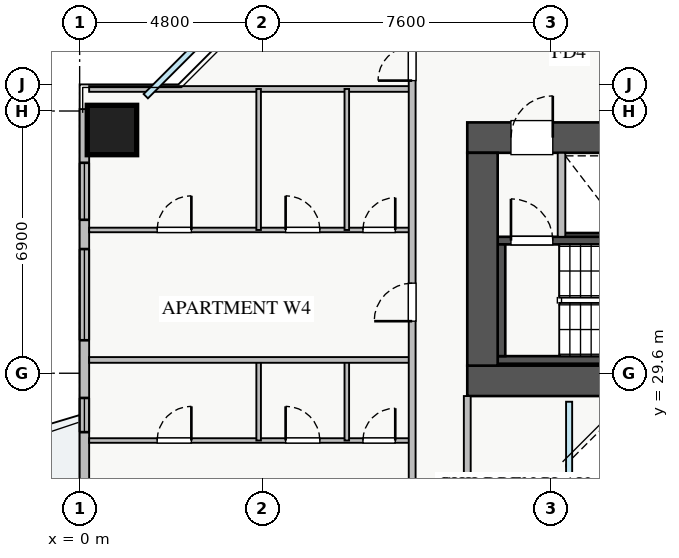
"""IFC4 building model, lengths in metres.
Left out: names, types, materials, properties, quantities, classifications, styles, units other than length and angle.
Written with IfcOpenShell. Run it as: python <this file> out.ifc"""

import sys

from ifc_helpers import new_model, si_unit, direction, frame, frame_2d, origin, origin_2d, place, context, subcontext, project, spatial, rectangle, extrude, source, transform, mapped, element, fill, save


model = new_model("IFC4")
c1 = context("Model", 3, precision=1e-05, world=origin(), true_north=direction((0.0, 1.0)))
c2 = subcontext(c1, "Body", "Model", "MODEL_VIEW")
j1 = project(units=[si_unit("LENGTHUNIT", "METRE"), si_unit("PLANEANGLEUNIT", "RADIAN")], contexts=[c1])
p1 = place(None, origin())
s1 = spatial("IfcSite", under=j1, at=p1, CompositionType="ELEMENT")
p2 = place(p1, origin())
s2 = spatial("IfcBuilding", under=s1, at=p2, CompositionType="ELEMENT")
p3 = place(p2, frame((0.0, 0.0, 60.0)))
s3 = spatial("IfcBuildingStorey", under=s2, at=p3, CompositionType="ELEMENT", Elevation=60.0)
p4 = place(p3, frame((12.68, 33.2, 0.0), z_axis=(0.0, 0.0, 1.0), x_axis=(1.0, 0.0, 0.0)))
e1 = element("IfcWall", 1, at=p4, inside=s3, PredefinedType="SHEAR", context=c2, shape_type="SweptSolid", body=[
    extrude(rectangle(XDim=1.94, YDim=0.18, at=frame_2d((0.97, 0.0))), origin(), (0.0, 0.0, 1.0), 3.07),
])
p5 = place(p3, frame((11.0, 29.95, 0.0), z_axis=(0.0, 0.0, 1.0), x_axis=(1.0, 0.0, 0.0)))
e2 = element("IfcWall", 2, at=p5, inside=s3, PredefinedType="SHEAR", context=c2, shape_type="SweptSolid", body=[
    extrude(rectangle(XDim=7.15, YDim=0.2, at=frame_2d((3.575, 0.0))), origin(), (0.0, 0.0, 1.0), 3.25),
])
p6 = place(p3, frame((11.0, 33.09, 0.0), z_axis=(0.0, 0.0, 1.0), x_axis=(1.0, 0.0, 0.0)))
e3 = element("IfcWall", 3, at=p6, inside=s3, PredefinedType="SHEAR", context=c2, shape_type="SweptSolid", body=[
    extrude(rectangle(XDim=7.15, YDim=0.2, at=frame_2d((3.575, 0.0))), origin(), (0.0, 0.0, 1.0), 3.25),
])
p7 = place(p6, frame((0.35, 0.0, 0.0)))
e4 = element("IfcOpeningElement", 4, at=p7, cuts=e3, PredefinedType="OPENING", context=c2, shape_type="SweptSolid", body=[
    extrude(rectangle(XDim=1.1, YDim=2.05, at=frame_2d((0.55, 1.025))), frame((0.0, 0.11, 0.0), z_axis=(0.0, -1.0, 0.0), x_axis=(1.0, 0.0, 0.0)), (0.0, 0.0, 1.0), 0.22),
])
p8 = place(p3, frame((11.1, 30.05, 0.0), z_axis=(0.0, 0.0, 1.0), x_axis=(0.0, 1.0, 0.0)))
e5 = element("IfcWall", 5, at=p8, inside=s3, PredefinedType="SHEAR", context=c2, shape_type="SweptSolid", body=[
    extrude(rectangle(XDim=2.94, YDim=0.2, at=frame_2d((1.47, 0.0))), origin(), (0.0, 0.0, 1.0), 3.25),
])
p9 = place(p3, frame((10.2, 29.4, 0.0), z_axis=(0.0, 0.0, 1.0), x_axis=(1.0, 0.0, 0.0)))
e6 = element("IfcWall", 6, at=p9, inside=s3, PredefinedType="SHEAR", context=c2, shape_type="SweptSolid", body=[
    extrude(rectangle(XDim=17.6, YDim=0.8, at=frame_2d((8.8, 0.0))), origin(), (0.0, 0.0, 1.0), 3.25),
])
p10 = place(p3, frame((10.2, 35.8, 0.0), z_axis=(0.0, 0.0, 1.0), x_axis=(1.0, 0.0, 0.0)))
e7 = element("IfcWall", 7, at=p10, inside=s3, PredefinedType="SHEAR", context=c2, shape_type="SweptSolid", body=[
    extrude(rectangle(XDim=17.6, YDim=0.8, at=frame_2d((8.8, 0.0))), origin(), (0.0, 0.0, 1.0), 3.25),
])
p11 = place(p10, frame((1.15, 0.0, 0.0)))
e8 = element("IfcOpeningElement", 8, at=p11, cuts=e7, PredefinedType="OPENING", context=c2, shape_type="SweptSolid", body=[
    extrude(rectangle(XDim=1.1, YDim=2.05, at=frame_2d((0.55, 1.025))), frame((0.0, 0.41, 0.0), z_axis=(0.0, -1.0, 0.0), x_axis=(1.0, 0.0, 0.0)), (0.0, 0.0, 1.0), 0.82),
])
p12 = place(p10, frame((8.3, 0.0, 0.0)))
e9 = element("IfcOpeningElement", 9, at=p12, cuts=e7, PredefinedType="OPENING", context=c2, shape_type="SweptSolid", body=[
    extrude(rectangle(XDim=1.1, YDim=2.05, at=frame_2d((0.55, 1.025))), frame((0.0, 0.41, 0.0), z_axis=(0.0, -1.0, 0.0), x_axis=(1.0, 0.0, 0.0)), (0.0, 0.0, 1.0), 0.82),
])
p13 = place(p10, frame((10.05, 0.0, 0.0)))
e10 = element("IfcOpeningElement", 10, at=p13, cuts=e7, PredefinedType="OPENING", context=c2, shape_type="SweptSolid", body=[
    extrude(rectangle(XDim=1.1, YDim=2.05, at=frame_2d((0.55, 1.025))), frame((0.0, 0.41, 0.0), z_axis=(0.0, -1.0, 0.0), x_axis=(1.0, 0.0, 0.0)), (0.0, 0.0, 1.0), 0.82),
])
p14 = place(p10, frame((14.74, 0.0, 0.0)))
e11 = element("IfcOpeningElement", 11, at=p14, cuts=e7, PredefinedType="OPENING", context=c2, shape_type="SweptSolid", body=[
    extrude(rectangle(XDim=1.0, YDim=2.05, at=frame_2d((0.5, 1.025))), frame((0.0, 0.41, 0.0), z_axis=(0.0, -1.0, 0.0), x_axis=(1.0, 0.0, 0.0)), (0.0, 0.0, 1.0), 0.82),
])
p15 = place(p10, frame((11.835, 0.0, 0.0)))
e12 = element("IfcOpeningElement", 12, at=p15, cuts=e7, PredefinedType="OPENING", context=c2, shape_type="SweptSolid", body=[
    extrude(rectangle(XDim=1.0, YDim=2.05, at=frame_2d((0.5, 1.025))), frame((0.0, 0.41, 0.0), z_axis=(0.0, -1.0, 0.0), x_axis=(1.0, 0.0, 0.0)), (0.0, 0.0, 1.0), 0.82),
])
p16 = place(p10, frame((13.37, 0.0, 0.0)))
e13 = element("IfcOpeningElement", 13, at=p16, cuts=e7, PredefinedType="OPENING", context=c2, shape_type="SweptSolid", body=[
    extrude(rectangle(XDim=1.0, YDim=2.05, at=frame_2d((0.5, 1.025))), frame((0.0, 0.41, 0.0), z_axis=(0.0, -1.0, 0.0), x_axis=(1.0, 0.0, 0.0)), (0.0, 0.0, 1.0), 0.82),
])
p17 = place(p3, frame((10.6, 29.8, 0.0), z_axis=(0.0, 0.0, 1.0), x_axis=(0.0, 1.0, 0.0)))
e14 = element("IfcWall", 14, at=p17, inside=s3, PredefinedType="SHEAR", context=c2, shape_type="SweptSolid", body=[
    extrude(rectangle(XDim=5.6, YDim=0.8, at=frame_2d((2.8, 0.0))), origin(), (0.0, 0.0, 1.0), 3.25),
])
m1 = source(origin(), c2, "Body", "SweptSolid", [
    extrude(rectangle(XDim=1.3, YDim=1.3, at=origin_2d()), origin(), (0.0, 0.0, 1.0), 3.25),
])
p18 = place(p3, frame((0.85, 36.0, 0.0), z_axis=(0.0, 0.0, 1.0), x_axis=(1.0, 0.0, 0.0)))
e15 = element("IfcColumn", 15, at=p18, inside=s3, PredefinedType="COLUMN", context=c2, shape_type="MappedRepresentation", body=[
    mapped(m1, transform((0.0, 0.0, 0.0), x_axis=(1.0, 0.0, 0.0), y_axis=(0.0, 1.0, 0.0), z_axis=(0.0, 0.0, 1.0), scale=1.0)),
])
p19 = place(p3, frame((0.125, 9.45, 0.0), z_axis=(0.0, 0.0, 1.0), x_axis=(0.0, 1.0, 0.0)))
e16 = element("IfcWall", 16, at=p19, inside=s3, PredefinedType="STANDARD", context=c2, shape_type="SweptSolid", body=[
    extrude(rectangle(XDim=27.1, YDim=0.25, at=frame_2d((13.55, 0.0))), origin(), (0.0, 0.0, 1.0), 2.61),
])
p20 = place(p19, frame((14.4, 0.0, 0.0)))
e17 = element("IfcOpeningElement", 17, at=p20, cuts=e16, PredefinedType="OPENING", context=c2, shape_type="SweptSolid", body=[
    extrude(rectangle(XDim=1.2, YDim=2.1, at=frame_2d((0.6, 1.05))), frame((0.0, 0.135, 0.0), z_axis=(0.0, -1.0, 0.0), x_axis=(1.0, 0.0, 0.0)), (0.0, 0.0, 1.0), 0.27),
])
p21 = place(p19, frame((1.417, 0.0, 0.9)))
e18 = element("IfcOpeningElement", 18, at=p21, cuts=e16, PredefinedType="OPENING", context=c2, shape_type="SweptSolid", body=[
    extrude(rectangle(XDim=1.2, YDim=1.4, at=frame_2d((0.6, 0.7))), frame((0.0, 0.135, 0.0), z_axis=(0.0, -1.0, 0.0), x_axis=(1.0, 0.0, 0.0)), (0.0, 0.0, 1.0), 0.27),
])
p22 = place(p19, frame((24.188, 0.0, 0.9)))
e19 = element("IfcOpeningElement", 19, at=p22, cuts=e16, PredefinedType="OPENING", context=c2, shape_type="SweptSolid", body=[
    extrude(rectangle(XDim=1.5, YDim=1.5, at=frame_2d((0.75, 0.75))), frame((0.0, 0.135, 0.0), z_axis=(0.0, -1.0, 0.0), x_axis=(1.0, 0.0, 0.0)), (0.0, 0.0, 1.0), 0.27),
])
p23 = place(p19, frame((3.722, 0.0, 0.9)))
e20 = element("IfcOpeningElement", 20, at=p23, cuts=e16, PredefinedType="OPENING", context=c2, shape_type="SweptSolid", body=[
    extrude(rectangle(XDim=2.4, YDim=1.5, at=frame_2d((1.2, 0.75))), frame((0.0, 0.135, 0.0), z_axis=(0.0, -1.0, 0.0), x_axis=(1.0, 0.0, 0.0)), (0.0, 0.0, 1.0), 0.27),
])
p24 = place(p19, frame((21.018, 0.0, 0.9)))
e21 = element("IfcOpeningElement", 21, at=p24, cuts=e16, PredefinedType="OPENING", context=c2, shape_type="SweptSolid", body=[
    extrude(rectangle(XDim=2.4, YDim=1.5, at=frame_2d((1.2, 0.75))), frame((0.0, 0.135, 0.0), z_axis=(0.0, -1.0, 0.0), x_axis=(1.0, 0.0, 0.0)), (0.0, 0.0, 1.0), 0.27),
])
p25 = place(p19, frame((18.6, 0.0, 0.9)))
e22 = element("IfcOpeningElement", 22, at=p25, cuts=e16, PredefinedType="OPENING", context=c2, shape_type="SweptSolid", body=[
    extrude(rectangle(XDim=0.9, YDim=1.2, at=frame_2d((0.45, 0.6))), frame((0.0, 0.135, 0.0), z_axis=(0.0, -1.0, 0.0), x_axis=(1.0, 0.0, 0.0)), (0.0, 0.0, 1.0), 0.27),
])
p26 = place(p3, frame((12.68, 33.19, 0.0), z_axis=(0.0, 0.0, 1.0), x_axis=(0.0, 1.0, 0.0)))
e23 = element("IfcWall", 23, at=p26, inside=s3, PredefinedType="PARTITIONING", context=c2, shape_type="SweptSolid", body=[
    extrude(rectangle(XDim=2.21, YDim=0.2, at=frame_2d((1.105, 0.0))), origin(), (0.0, 0.0, 1.0), 3.07),
])
p27 = place(p3, frame((0.25, 37.08, 0.0), z_axis=(0.0, 0.0, 1.0), x_axis=(1.0, 0.0, 0.0)))
e24 = element("IfcWall", 24, at=p27, inside=s3, PredefinedType="PARTITIONING", context=c2, shape_type="SweptSolid", body=[
    extrude(rectangle(XDim=8.5, YDim=0.15, at=frame_2d((4.25, 0.0))), origin(), (0.0, 0.0, 1.0), 3.07),
])
p28 = place(p3, frame((0.25, 27.83, 0.0), z_axis=(0.0, 0.0, 1.0), x_axis=(1.0, 0.0, 0.0)))
e25 = element("IfcWall", 25, at=p28, inside=s3, PredefinedType="PLUMBINGWALL", context=c2, shape_type="SweptSolid", body=[
    extrude(rectangle(XDim=8.5, YDim=0.12, at=frame_2d((4.25, 0.0))), origin(), (0.0, 0.0, 1.0), 2.765),
])
p29 = place(p28, frame((1.79, 0.0, 0.0)))
e26 = element("IfcOpeningElement", 26, at=p29, cuts=e25, PredefinedType="OPENING", context=c2, shape_type="SweptSolid", body=[
    extrude(rectangle(XDim=0.9, YDim=2.05, at=frame_2d((0.45, 1.025))), frame((0.0, 0.07, 0.0), z_axis=(0.0, -1.0, 0.0), x_axis=(1.0, 0.0, 0.0)), (0.0, 0.0, 1.0), 0.14),
])
p30 = place(p28, frame((5.17, 0.0, 0.0)))
e27 = element("IfcOpeningElement", 27, at=p30, cuts=e25, PredefinedType="OPENING", context=c2, shape_type="SweptSolid", body=[
    extrude(rectangle(XDim=0.9, YDim=2.05, at=frame_2d((0.45, 1.025))), frame((0.0, 0.07, 0.0), z_axis=(0.0, -1.0, 0.0), x_axis=(1.0, 0.0, 0.0)), (0.0, 0.0, 1.0), 0.14),
])
p31 = place(p28, frame((7.205, 0.0, 0.0)))
e28 = element("IfcOpeningElement", 28, at=p31, cuts=e25, PredefinedType="OPENING", context=c2, shape_type="SweptSolid", body=[
    extrude(rectangle(XDim=0.85, YDim=2.05, at=frame_2d((0.425, 1.025))), frame((0.0, 0.07, 0.0), z_axis=(0.0, -1.0, 0.0), x_axis=(1.0, 0.0, 0.0)), (0.0, 0.0, 1.0), 0.14),
])
for number, where, z_axis, x_axis in (
    (29, (4.71, 27.83, 0.0), (0.0, 0.0, 1.0), (0.0, 1.0, 0.0)),
    (30, (7.03, 27.83, 0.0), (0.0, 0.0, 1.0), (0.0, 1.0, 0.0)),
):
    element("IfcWall", number, at=place(p3, frame(where, z_axis=z_axis, x_axis=x_axis)), inside=s3, PredefinedType="PLUMBINGWALL", context=c2, shape_type="SweptSolid", body=[
        extrude(rectangle(XDim=2.12, YDim=0.12, at=frame_2d((1.06, 0.0))), origin(), (0.0, 0.0, 1.0), 3.07),
    ])
p32 = place(p3, frame((0.25, 33.37, 0.0), z_axis=(0.0, 0.0, 1.0), x_axis=(1.0, 0.0, 0.0)))
e31 = element("IfcWall", 31, at=p32, inside=s3, PredefinedType="PLUMBINGWALL", context=c2, shape_type="SweptSolid", body=[
    extrude(rectangle(XDim=8.5, YDim=0.12, at=frame_2d((4.25, 0.0))), origin(), (0.0, 0.0, 1.0), 3.07),
])
p33 = place(p32, frame((1.79, 0.0, 0.0)))
e32 = element("IfcOpeningElement", 32, at=p33, cuts=e31, PredefinedType="OPENING", context=c2, shape_type="SweptSolid", body=[
    extrude(rectangle(XDim=0.9, YDim=2.05, at=frame_2d((0.45, 1.025))), frame((0.0, 0.07, 0.0), z_axis=(0.0, -1.0, 0.0), x_axis=(1.0, 0.0, 0.0)), (0.0, 0.0, 1.0), 0.14),
])
p34 = place(p32, frame((5.17, 0.0, 0.0)))
e33 = element("IfcOpeningElement", 33, at=p34, cuts=e31, PredefinedType="OPENING", context=c2, shape_type="SweptSolid", body=[
    extrude(rectangle(XDim=0.9, YDim=2.05, at=frame_2d((0.45, 1.025))), frame((0.0, 0.07, 0.0), z_axis=(0.0, -1.0, 0.0), x_axis=(1.0, 0.0, 0.0)), (0.0, 0.0, 1.0), 0.14),
])
p35 = place(p32, frame((7.205, 0.0, 0.0)))
e34 = element("IfcOpeningElement", 34, at=p35, cuts=e31, PredefinedType="OPENING", context=c2, shape_type="SweptSolid", body=[
    extrude(rectangle(XDim=0.85, YDim=2.05, at=frame_2d((0.425, 1.025))), frame((0.0, 0.07, 0.0), z_axis=(0.0, -1.0, 0.0), x_axis=(1.0, 0.0, 0.0)), (0.0, 0.0, 1.0), 0.14),
])
for number, where, z_axis, x_axis in (
    (35, (4.71, 33.37, 0.0), (0.0, 0.0, 1.0), (0.0, 1.0, 0.0)),
    (36, (7.03, 33.37, 0.0), (0.0, 0.0, 1.0), (0.0, 1.0, 0.0)),
):
    element("IfcWall", number, at=place(p3, frame(where, z_axis=z_axis, x_axis=x_axis)), inside=s3, PredefinedType="PLUMBINGWALL", context=c2, shape_type="SweptSolid", body=[
        extrude(rectangle(XDim=3.71, YDim=0.12, at=frame_2d((1.855, 0.0))), origin(), (0.0, 0.0, 1.0), 3.07),
    ])
p36 = place(p3, frame((0.25, 29.95, 0.0), z_axis=(0.0, 0.0, 1.0), x_axis=(1.0, 0.0, 0.0)))
e37 = element("IfcWall", 37, at=p36, inside=s3, PredefinedType="PARTITIONING", context=c2, shape_type="SweptSolid", body=[
    extrude(rectangle(XDim=8.5, YDim=0.15, at=frame_2d((4.25, 0.0))), origin(), (0.0, 0.0, 1.0), 3.07),
])
p37 = place(p3, frame((8.75, 7.21, 0.0), z_axis=(0.0, 0.0, 1.0), x_axis=(0.0, 1.0, 0.0)))
e38 = element("IfcWall", 38, at=p37, inside=s3, PredefinedType="PARTITIONING", context=c2, shape_type="SweptSolid", body=[
    extrude(rectangle(XDim=31.23, YDim=0.18, at=frame_2d((15.615, 0.0))), origin(), (0.0, 0.0, 1.0), 3.07),
])
p38 = place(p37, frame((30.09, 0.0, 0.0)))
e39 = element("IfcOpeningElement", 39, at=p38, cuts=e38, PredefinedType="OPENING", context=c2, shape_type="SweptSolid", body=[
    extrude(rectangle(XDim=0.9, YDim=2.05, at=frame_2d((0.45, 1.025))), frame((0.0, 0.1, 0.0), z_axis=(0.0, -1.0, 0.0), x_axis=(1.0, 0.0, 0.0)), (0.0, 0.0, 1.0), 0.2),
])
p39 = place(p37, frame((0.24, 0.0, 0.0)))
e40 = element("IfcOpeningElement", 40, at=p39, cuts=e38, PredefinedType="OPENING", context=c2, shape_type="SweptSolid", body=[
    extrude(rectangle(XDim=0.9, YDim=2.05, at=frame_2d((0.45, 1.025))), frame((0.0, 0.1, 0.0), z_axis=(0.0, -1.0, 0.0), x_axis=(1.0, 0.0, 0.0)), (0.0, 0.0, 1.0), 0.2),
])
p40 = place(p37, frame((2.555, 0.0, 0.0)))
e41 = element("IfcOpeningElement", 41, at=p40, cuts=e38, PredefinedType="OPENING", context=c2, shape_type="SweptSolid", body=[
    extrude(rectangle(XDim=1.0, YDim=2.05, at=frame_2d((0.5, 1.025))), frame((0.0, 0.1, 0.0), z_axis=(0.0, -1.0, 0.0), x_axis=(1.0, 0.0, 0.0)), (0.0, 0.0, 1.0), 0.2),
])
p41 = place(p37, frame((11.91, 0.0, 0.0)))
e42 = element("IfcOpeningElement", 42, at=p41, cuts=e38, PredefinedType="OPENING", context=c2, shape_type="SweptSolid", body=[
    extrude(rectangle(XDim=1.0, YDim=2.05, at=frame_2d((0.5, 1.025))), frame((0.0, 0.1, 0.0), z_axis=(0.0, -1.0, 0.0), x_axis=(1.0, 0.0, 0.0)), (0.0, 0.0, 1.0), 0.2),
])
p42 = place(p37, frame((17.425, 0.0, 0.0)))
e43 = element("IfcOpeningElement", 43, at=p42, cuts=e38, PredefinedType="OPENING", context=c2, shape_type="SweptSolid", body=[
    extrude(rectangle(XDim=1.0, YDim=2.05, at=frame_2d((0.5, 1.025))), frame((0.0, 0.1, 0.0), z_axis=(0.0, -1.0, 0.0), x_axis=(1.0, 0.0, 0.0)), (0.0, 0.0, 1.0), 0.2),
])
p43 = place(p37, frame((23.76, 0.0, 0.0)))
e44 = element("IfcOpeningElement", 44, at=p43, cuts=e38, PredefinedType="OPENING", context=c2, shape_type="SweptSolid", body=[
    extrude(rectangle(XDim=1.0, YDim=2.05, at=frame_2d((0.5, 1.025))), frame((0.0, 0.1, 0.0), z_axis=(0.0, -1.0, 0.0), x_axis=(1.0, 0.0, 0.0)), (0.0, 0.0, 1.0), 0.2),
])
p44 = place(p3, frame((10.2, 17.0, 0.0), z_axis=(0.0, 0.0, 1.0), x_axis=(0.0, 1.0, 0.0)))
e45 = element("IfcWall", 45, at=p44, inside=s3, PredefinedType="PARTITIONING", context=c2, shape_type="SweptSolid", body=[
    extrude(rectangle(XDim=12.0, YDim=0.18, at=frame_2d((6.0, 0.0))), origin(), (0.0, 0.0, 1.0), 3.07),
])
p45 = place(p44, frame((1.5, 0.0, 0.0)))
e46 = element("IfcOpeningElement", 46, at=p45, cuts=e45, PredefinedType="OPENING", context=c2, shape_type="SweptSolid", body=[
    extrude(rectangle(XDim=0.85, YDim=2.05, at=frame_2d((0.425, 1.025))), frame((0.0, 0.1, 0.0), z_axis=(0.0, -1.0, 0.0), x_axis=(1.0, 0.0, 0.0)), (0.0, 0.0, 1.0), 0.2),
])
p46 = place(p44, frame((6.5, 0.0, 0.0)))
e47 = element("IfcOpeningElement", 47, at=p46, cuts=e45, PredefinedType="OPENING", context=c2, shape_type="SweptSolid", body=[
    extrude(rectangle(XDim=1.0, YDim=2.05, at=frame_2d((0.5, 1.025))), frame((0.0, 0.1, 0.0), z_axis=(0.0, -1.0, 0.0), x_axis=(1.0, 0.0, 0.0)), (0.0, 0.0, 1.0), 0.2),
])
m2 = source(origin(), c2, "Body", "SweptSolid", [
    extrude(rectangle(XDim=1.5, YDim=1.5, at=frame_2d((0.75, 0.75))), frame((0.0, 0.03, 0.0), z_axis=(0.0, -1.0, 0.0), x_axis=(1.0, 0.0, 0.0)), (0.0, 0.0, 1.0), 0.06),
])
p47 = place(p22, origin())
e48 = element("IfcWindow", 48, at=p47, inside=s3, PartitioningType="TRIPLE_PANEL_VERTICAL", PredefinedType="WINDOW", context=c2, shape_type="MappedRepresentation", body=[
    mapped(m2, transform((0.0, 0.0, 0.0), x_axis=(1.0, 0.0, 0.0), y_axis=(0.0, 1.0, 0.0), z_axis=(0.0, 0.0, 1.0), scale=1.0)),
])
fill(e19, e48)
m3 = source(origin(), c2, "Body", "SweptSolid", [
    extrude(rectangle(XDim=1.1, YDim=2.05, at=frame_2d((0.55, 1.025))), frame((0.0, 0.025, 0.0), z_axis=(0.0, -1.0, 0.0), x_axis=(1.0, 0.0, 0.0)), (0.0, 0.0, 1.0), 0.05),
])
p48 = place(p11, origin())
e49 = element("IfcDoor", 49, at=p48, inside=s3, OperationType="SINGLE_SWING_RIGHT", PredefinedType="DOOR", context=c2, shape_type="MappedRepresentation", body=[
    mapped(m3, transform((0.0, 0.0, 0.0), x_axis=(1.0, 0.0, 0.0), y_axis=(0.0, 1.0, 0.0), z_axis=(0.0, 0.0, 1.0), scale=1.0)),
])
fill(e8, e49)
p49 = place(p7, origin())
e50 = element("IfcDoor", 50, at=p49, inside=s3, OperationType="SINGLE_SWING_LEFT", PredefinedType="DOOR", context=c2, shape_type="MappedRepresentation", body=[
    mapped(m3, transform((0.0, 0.0, 0.0), x_axis=(1.0, 0.0, 0.0), y_axis=(0.0, 1.0, 0.0), z_axis=(0.0, 0.0, 1.0), scale=1.0)),
])
fill(e4, e50)
m4 = source(origin(), c2, "Body", "SweptSolid", [
    extrude(rectangle(XDim=0.9, YDim=2.05, at=frame_2d((0.45, 1.025))), frame((0.0, 0.025, 0.0), z_axis=(0.0, -1.0, 0.0), x_axis=(1.0, 0.0, 0.0)), (0.0, 0.0, 1.0), 0.05),
])
p50 = place(p29, origin())
e51 = element("IfcDoor", 51, at=p50, inside=s3, OperationType="SINGLE_SWING_RIGHT", PredefinedType="DOOR", context=c2, shape_type="MappedRepresentation", body=[
    mapped(m4, transform((0.0, 0.0, 0.0), x_axis=(1.0, 0.0, 0.0), y_axis=(0.0, 1.0, 0.0), z_axis=(0.0, 0.0, 1.0), scale=1.0)),
])
fill(e26, e51)
p51 = place(p30, origin())
e52 = element("IfcDoor", 52, at=p51, inside=s3, OperationType="SINGLE_SWING_LEFT", PredefinedType="DOOR", context=c2, shape_type="MappedRepresentation", body=[
    mapped(m4, transform((0.0, 0.0, 0.0), x_axis=(1.0, 0.0, 0.0), y_axis=(0.0, 1.0, 0.0), z_axis=(0.0, 0.0, 1.0), scale=1.0)),
])
fill(e27, e52)
m5 = source(origin(), c2, "Body", "SweptSolid", [
    extrude(rectangle(XDim=0.85, YDim=2.05, at=frame_2d((0.425, 1.025))), frame((0.0, 0.025, 0.0), z_axis=(0.0, -1.0, 0.0), x_axis=(1.0, 0.0, 0.0)), (0.0, 0.0, 1.0), 0.05),
])
p52 = place(p31, origin())
e53 = element("IfcDoor", 53, at=p52, inside=s3, OperationType="SINGLE_SWING_RIGHT", PredefinedType="DOOR", context=c2, shape_type="MappedRepresentation", body=[
    mapped(m5, transform((0.0, 0.0, 0.0), x_axis=(1.0, 0.0, 0.0), y_axis=(0.0, 1.0, 0.0), z_axis=(0.0, 0.0, 1.0), scale=1.0)),
])
fill(e28, e53)
p53 = place(p33, origin())
e54 = element("IfcDoor", 54, at=p53, inside=s3, OperationType="SINGLE_SWING_RIGHT", PredefinedType="DOOR", context=c2, shape_type="MappedRepresentation", body=[
    mapped(m4, transform((0.0, 0.0, 0.0), x_axis=(1.0, 0.0, 0.0), y_axis=(0.0, 1.0, 0.0), z_axis=(0.0, 0.0, 1.0), scale=1.0)),
])
fill(e32, e54)
p54 = place(p34, origin())
e55 = element("IfcDoor", 55, at=p54, inside=s3, OperationType="SINGLE_SWING_LEFT", PredefinedType="DOOR", context=c2, shape_type="MappedRepresentation", body=[
    mapped(m4, transform((0.0, 0.0, 0.0), x_axis=(1.0, 0.0, 0.0), y_axis=(0.0, 1.0, 0.0), z_axis=(0.0, 0.0, 1.0), scale=1.0)),
])
fill(e33, e55)
p55 = place(p35, origin())
e56 = element("IfcDoor", 56, at=p55, inside=s3, OperationType="SINGLE_SWING_RIGHT", PredefinedType="DOOR", context=c2, shape_type="MappedRepresentation", body=[
    mapped(m5, transform((0.0, 0.0, 0.0), x_axis=(1.0, 0.0, 0.0), y_axis=(0.0, 1.0, 0.0), z_axis=(0.0, 0.0, 1.0), scale=1.0)),
])
fill(e34, e56)
p56 = place(p38, origin())
e57 = element("IfcDoor", 57, at=p56, inside=s3, OperationType="SINGLE_SWING_LEFT", PredefinedType="DOOR", context=c2, shape_type="MappedRepresentation", body=[
    mapped(m4, transform((0.0, 0.0, 0.0), x_axis=(1.0, 0.0, 0.0), y_axis=(0.0, 1.0, 0.0), z_axis=(0.0, 0.0, 1.0), scale=1.0)),
])
fill(e39, e57)
m6 = source(origin(), c2, "Body", "SweptSolid", [
    extrude(rectangle(XDim=1.0, YDim=2.05, at=frame_2d((0.5, 1.025))), frame((0.0, 0.025, 0.0), z_axis=(0.0, -1.0, 0.0), x_axis=(1.0, 0.0, 0.0)), (0.0, 0.0, 1.0), 0.05),
])
p57 = place(p43, origin())
e58 = element("IfcDoor", 58, at=p57, inside=s3, OperationType="SINGLE_SWING_LEFT", PredefinedType="DOOR", context=c2, shape_type="MappedRepresentation", body=[
    mapped(m6, transform((0.0, 0.0, 0.0), x_axis=(1.0, 0.0, 0.0), y_axis=(0.0, 1.0, 0.0), z_axis=(0.0, 0.0, 1.0), scale=1.0)),
])
fill(e44, e58)
m7 = source(origin(), c2, "Body", "SweptSolid", [
    extrude(rectangle(XDim=2.4, YDim=1.5, at=frame_2d((1.2, 0.75))), frame((0.0, 0.03, 0.0), z_axis=(0.0, -1.0, 0.0), x_axis=(1.0, 0.0, 0.0)), (0.0, 0.0, 1.0), 0.06),
])
p58 = place(p24, origin())
e59 = element("IfcWindow", 59, at=p58, inside=s3, PartitioningType="TRIPLE_PANEL_VERTICAL", PredefinedType="WINDOW", context=c2, shape_type="MappedRepresentation", body=[
    mapped(m7, transform((0.0, 0.0, 0.0), x_axis=(1.0, 0.0, 0.0), y_axis=(0.0, 1.0, 0.0), z_axis=(0.0, 0.0, 1.0), scale=1.0)),
])
fill(e21, e59)
m8 = source(origin(), c2, "Body", "SweptSolid", [
    extrude(rectangle(XDim=0.9, YDim=1.2, at=frame_2d((0.45, 0.6))), frame((0.0, 0.03, 0.0), z_axis=(0.0, -1.0, 0.0), x_axis=(1.0, 0.0, 0.0)), (0.0, 0.0, 1.0), 0.06),
])
p59 = place(p25, origin())
e60 = element("IfcWindow", 60, at=p59, inside=s3, PartitioningType="SINGLE_PANEL", PredefinedType="WINDOW", context=c2, shape_type="MappedRepresentation", body=[
    mapped(m8, transform((0.0, 0.0, 0.0), x_axis=(1.0, 0.0, 0.0), y_axis=(0.0, 1.0, 0.0), z_axis=(0.0, 0.0, 1.0), scale=1.0)),
])
fill(e22, e60)
save(model, sys.argv[1])
